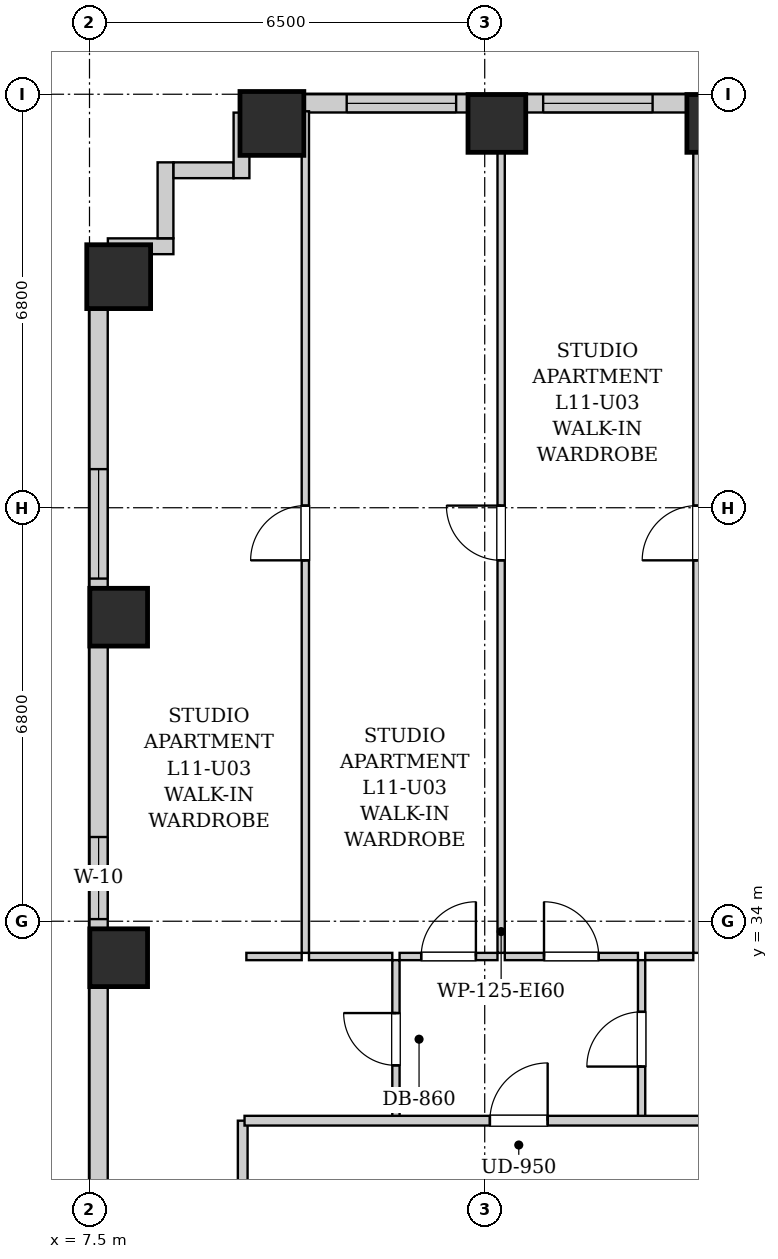
"""IFC4 building model, lengths in metres.
Left out: names, types, materials, properties, quantities, classifications, styles, units other than length and angle.
Written with IfcOpenShell. Run it as: python <this file> out.ifc"""

import sys

from ifc_helpers import new_model, si_unit, direction, frame, frame_2d, origin, origin_2d, place, context, subcontext, project, spatial, rectangle, extrude, element, fill, save


model = new_model("IFC4")
c1 = context("Model", 3, precision=1e-05, world=origin(), true_north=direction((0.0, 1.0)))
c2 = subcontext(c1, "Body", "Model", "MODEL_VIEW")
j1 = project(units=[si_unit("LENGTHUNIT", "METRE"), si_unit("PLANEANGLEUNIT", "RADIAN")], contexts=[c1])
p1 = place(None, origin())
s1 = spatial("IfcSite", under=j1, at=p1, CompositionType="ELEMENT")
p2 = place(p1, origin())
s2 = spatial("IfcBuilding", under=s1, at=p2, CompositionType="ELEMENT")
p3 = place(p2, frame((0.0, 0.0, 45.0)))
s3 = spatial("IfcBuildingStorey", under=s2, at=p3, CompositionType="ELEMENT", Elevation=45.0)
p4 = place(p3, frame((10.5, 47.12, 0.0), z_axis=(0.0, 0.0, 1.0), x_axis=(1.0, 0.0, 0.0)))
e1 = element("IfcColumn", 1, at=p4, inside=s3, PredefinedType="COLUMN", context=c2, shape_type="SweptSolid", body=[
    extrude(rectangle(XDim=1.05, YDim=1.05, at=origin_2d()), origin(), (0.0, 0.0, 1.0), 3.2),
])
for number, where, z_axis, x_axis in (
    (2, (14.2, 47.12, 0.0), (0.0, 0.0, 1.0), (1.0, 0.0, 0.0)),
    (3, (17.8, 47.12, 0.0), (0.0, 0.0, 1.0), (1.0, 0.0, 0.0)),
    (4, (7.98, 33.4, 0.0), (0.0, 0.0, 1.0), (1.0, 0.0, 0.0)),
    (5, (7.98, 39.0, 0.0), (0.0, 0.0, 1.0), (1.0, 0.0, 0.0)),
):
    element("IfcColumn", number, at=place(p3, frame(where, z_axis=z_axis, x_axis=x_axis)), inside=s3, PredefinedType="COLUMN", context=c2, shape_type="SweptSolid", body=[
        extrude(rectangle(XDim=0.95, YDim=0.95, at=origin_2d()), origin(), (0.0, 0.0, 1.0), 3.2),
    ])
p5 = place(p3, frame((7.98, 44.6, 0.0), z_axis=(0.0, 0.0, 1.0), x_axis=(1.0, 0.0, 0.0)))
e6 = element("IfcColumn", 6, at=p5, inside=s3, PredefinedType="COLUMN", context=c2, shape_type="SweptSolid", body=[
    extrude(rectangle(XDim=1.05, YDim=1.05, at=origin_2d()), origin(), (0.0, 0.0, 1.0), 3.2),
])
p6 = place(p3, frame((10.0, 47.45, 0.0), z_axis=(0.0, 0.0, 1.0), x_axis=(1.0, 0.0, 0.0)))
e7 = element("IfcWall", 7, at=p6, inside=s3, PredefinedType="SOLIDWALL", context=c2, shape_type="SweptSolid", body=[
    extrude(rectangle(XDim=25.7, YDim=0.3, at=frame_2d((12.85, 0.0))), origin(), (0.0, 0.0, 1.0), 1.975),
])
p7 = place(p6, frame((1.73, 0.0, 0.55)))
e8 = element("IfcOpeningElement", 8, at=p7, cuts=e7, PredefinedType="OPENING", context=c2, shape_type="SweptSolid", body=[
    extrude(rectangle(XDim=1.8, YDim=1.2, at=frame_2d((0.9, 0.6))), frame((0.0, 0.16, 0.0), z_axis=(0.0, -1.0, 0.0), x_axis=(1.0, 0.0, 0.0)), (0.0, 0.0, 1.0), 0.32),
])
p8 = place(p6, frame((4.961, 0.0, 0.55)))
e9 = element("IfcOpeningElement", 9, at=p8, cuts=e7, PredefinedType="OPENING", context=c2, shape_type="SweptSolid", body=[
    extrude(rectangle(XDim=1.8, YDim=1.2, at=frame_2d((0.9, 0.6))), frame((0.0, 0.16, 0.0), z_axis=(0.0, -1.0, 0.0), x_axis=(1.0, 0.0, 0.0)), (0.0, 0.0, 1.0), 0.32),
])
p9 = place(p6, frame((8.435, 0.0, 0.55)))
e10 = element("IfcOpeningElement", 10, at=p9, cuts=e7, PredefinedType="OPENING", context=c2, shape_type="SweptSolid", body=[
    extrude(rectangle(XDim=1.8, YDim=1.2, at=frame_2d((0.9, 0.6))), frame((0.0, 0.16, 0.0), z_axis=(0.0, -1.0, 0.0), x_axis=(1.0, 0.0, 0.0)), (0.0, 0.0, 1.0), 0.32),
])
p10 = place(p6, frame((11.15, 0.0, 0.55)))
e11 = element("IfcOpeningElement", 11, at=p10, cuts=e7, PredefinedType="OPENING", context=c2, shape_type="SweptSolid", body=[
    extrude(rectangle(XDim=1.35, YDim=1.2, at=frame_2d((0.675, 0.6))), frame((0.0, 0.16, 0.0), z_axis=(0.0, -1.0, 0.0), x_axis=(1.0, 0.0, 0.0)), (0.0, 0.0, 1.0), 0.32),
])
p11 = place(p6, frame((17.812, 0.0, 0.55)))
e12 = element("IfcOpeningElement", 12, at=p11, cuts=e7, PredefinedType="OPENING", context=c2, shape_type="SweptSolid", body=[
    extrude(rectangle(XDim=1.8, YDim=1.2, at=frame_2d((0.9, 0.6))), frame((0.0, 0.16, 0.0), z_axis=(0.0, -1.0, 0.0), x_axis=(1.0, 0.0, 0.0)), (0.0, 0.0, 1.0), 0.32),
])
p12 = place(p6, frame((20.765, 0.0, 0.55)))
e13 = element("IfcOpeningElement", 13, at=p12, cuts=e7, PredefinedType="OPENING", context=c2, shape_type="SweptSolid", body=[
    extrude(rectangle(XDim=1.8, YDim=1.2, at=frame_2d((0.9, 0.6))), frame((0.0, 0.16, 0.0), z_axis=(0.0, -1.0, 0.0), x_axis=(1.0, 0.0, 0.0)), (0.0, 0.0, 1.0), 0.32),
])
p13 = place(p6, frame((23.835, 0.0, 0.55)))
e14 = element("IfcOpeningElement", 14, at=p13, cuts=e7, PredefinedType="OPENING", context=c2, shape_type="SweptSolid", body=[
    extrude(rectangle(XDim=1.35, YDim=1.2, at=frame_2d((0.675, 0.6))), frame((0.0, 0.16, 0.0), z_axis=(0.0, -1.0, 0.0), x_axis=(1.0, 0.0, 0.0)), (0.0, 0.0, 1.0), 0.32),
])
p14 = place(p3, frame((7.65, 19.4, 0.0), z_axis=(0.0, 0.0, 1.0), x_axis=(0.0, 1.0, 0.0)))
e15 = element("IfcWall", 15, at=p14, inside=s3, PredefinedType="SOLIDWALL", context=c2, shape_type="SweptSolid", body=[
    extrude(rectangle(XDim=25.7, YDim=0.3, at=frame_2d((12.85, 0.0))), origin(), (0.0, 0.0, 1.0), 1.975),
])
p15 = place(p14, frame((20.235, 0.0, 0.55)))
e16 = element("IfcOpeningElement", 16, at=p15, cuts=e15, PredefinedType="OPENING", context=c2, shape_type="SweptSolid", body=[
    extrude(rectangle(XDim=1.8, YDim=1.2, at=frame_2d((0.9, 0.6))), frame((0.0, 0.16, 0.0), z_axis=(0.0, -1.0, 0.0), x_axis=(1.0, 0.0, 0.0)), (0.0, 0.0, 1.0), 0.32),
])
p16 = place(p14, frame((14.635, 0.0, 0.55)))
e17 = element("IfcOpeningElement", 17, at=p16, cuts=e15, PredefinedType="OPENING", context=c2, shape_type="SweptSolid", body=[
    extrude(rectangle(XDim=1.35, YDim=1.2, at=frame_2d((0.675, 0.6))), frame((0.0, 0.16, 0.0), z_axis=(0.0, -1.0, 0.0), x_axis=(1.0, 0.0, 0.0)), (0.0, 0.0, 1.0), 0.32),
])
p17 = place(p14, frame((5.1, 0.0, 0.55)))
e18 = element("IfcOpeningElement", 18, at=p17, cuts=e15, PredefinedType="OPENING", context=c2, shape_type="SweptSolid", body=[
    extrude(rectangle(XDim=1.8, YDim=1.2, at=frame_2d((0.9, 0.6))), frame((0.0, 0.16, 0.0), z_axis=(0.0, -1.0, 0.0), x_axis=(1.0, 0.0, 0.0)), (0.0, 0.0, 1.0), 0.32),
])
p18 = place(p14, frame((7.16, 0.0, 0.55)))
e19 = element("IfcOpeningElement", 19, at=p18, cuts=e15, PredefinedType="OPENING", context=c2, shape_type="SweptSolid", body=[
    extrude(rectangle(XDim=1.35, YDim=1.2, at=frame_2d((0.675, 0.6))), frame((0.0, 0.16, 0.0), z_axis=(0.0, -1.0, 0.0), x_axis=(1.0, 0.0, 0.0)), (0.0, 0.0, 1.0), 0.32),
])
p19 = place(p3, frame((7.802, 45.1, 0.0), z_axis=(0.0, 0.0, 1.0), x_axis=(1.0, 0.0, 0.0)))
e20 = element("IfcWall", 20, at=p19, inside=s3, PredefinedType="SOLIDWALL", context=c2, shape_type="SweptSolid", body=[
    extrude(rectangle(XDim=1.078, YDim=0.26, at=frame_2d((0.539, 0.0))), origin(), (0.0, 0.0, 1.0), 2.94),
])
p20 = place(p3, frame((8.75, 45.232, 0.0), z_axis=(0.0, 0.0, 1.0), x_axis=(0.0, 1.0, 0.0)))
e21 = element("IfcWall", 21, at=p20, inside=s3, PredefinedType="SOLIDWALL", context=c2, shape_type="SweptSolid", body=[
    extrude(rectangle(XDim=1.248, YDim=0.26, at=frame_2d((0.624, 0.0))), origin(), (0.0, 0.0, 1.0), 2.94),
])
p21 = place(p3, frame((8.882, 46.35, 0.0), z_axis=(0.0, 0.0, 1.0), x_axis=(1.0, 0.0, 0.0)))
e22 = element("IfcWall", 22, at=p21, inside=s3, PredefinedType="SOLIDWALL", context=c2, shape_type="SweptSolid", body=[
    extrude(rectangle(XDim=0.986, YDim=0.26, at=frame_2d((0.493, 0.0))), origin(), (0.0, 0.0, 1.0), 2.94),
])
p22 = place(p3, frame((10.0, 46.22, 0.0), z_axis=(0.0, 0.0, 1.0), x_axis=(0.0, 1.0, 0.0)))
e23 = element("IfcWall", 23, at=p22, inside=s3, PredefinedType="SOLIDWALL", context=c2, shape_type="SweptSolid", body=[
    extrude(rectangle(XDim=1.078, YDim=0.26, at=frame_2d((0.539, 0.0))), origin(), (0.0, 0.0, 1.0), 2.94),
])
p23 = place(p3, frame((10.02, 28.98, 0.0), z_axis=(0.0, 0.0, 1.0), x_axis=(0.0, 1.0, 0.0)))
e24 = element("IfcWall", 24, at=p23, inside=s3, PredefinedType="PARTITIONING", context=c2, shape_type="SweptSolid", body=[
    extrude(rectangle(XDim=1.74, YDim=0.16, at=frame_2d((0.87, 0.0))), origin(), (0.0, 0.0, 1.0), 2.94),
])
p24 = place(p3, frame((12.54, 30.76, 0.0), z_axis=(0.0, 0.0, 1.0), x_axis=(0.0, 1.0, 0.0)))
e25 = element("IfcWall", 25, at=p24, inside=s3, PredefinedType="PARTITIONING", context=c2, shape_type="SweptSolid", body=[
    extrude(rectangle(XDim=2.6, YDim=0.12, at=frame_2d((1.3, 0.0))), origin(), (0.0, 0.0, 1.0), 2.94),
])
p25 = place(p24, frame((0.87, 0.0, 0.0)))
e26 = element("IfcOpeningElement", 26, at=p25, cuts=e25, PredefinedType="OPENING", context=c2, shape_type="SweptSolid", body=[
    extrude(rectangle(XDim=0.86, YDim=2.05, at=frame_2d((0.43, 1.025))), frame((0.0, 0.07, 0.0), z_axis=(0.0, -1.0, 0.0), x_axis=(1.0, 0.0, 0.0)), (0.0, 0.0, 1.0), 0.14),
])
p26 = place(p3, frame((10.08, 33.42, 0.0), z_axis=(0.0, 0.0, 1.0), x_axis=(1.0, 0.0, 0.0)))
e27 = element("IfcWall", 27, at=p26, inside=s3, PredefinedType="PARTITIONING", context=c2, shape_type="SweptSolid", body=[
    extrude(rectangle(XDim=0.91, YDim=0.12, at=frame_2d((0.455, 0.0))), origin(), (0.0, 0.0, 1.0), 2.94),
])
p27 = place(p3, frame((11.11, 33.42, 0.0), z_axis=(0.0, 0.0, 1.0), x_axis=(1.0, 0.0, 0.0)))
e28 = element("IfcWall", 28, at=p27, inside=s3, PredefinedType="PARTITIONING", context=c2, shape_type="SweptSolid", body=[
    extrude(rectangle(XDim=1.37, YDim=0.12, at=frame_2d((0.685, 0.0))), origin(), (0.0, 0.0, 1.0), 2.94),
])
p28 = place(p3, frame((16.58, 30.76, 0.0), z_axis=(0.0, 0.0, 1.0), x_axis=(0.0, 1.0, 0.0)))
e29 = element("IfcWall", 29, at=p28, inside=s3, PredefinedType="PARTITIONING", context=c2, shape_type="SweptSolid", body=[
    extrude(rectangle(XDim=2.6, YDim=0.12, at=frame_2d((1.3, 0.0))), origin(), (0.0, 0.0, 1.0), 2.94),
])
p29 = place(p28, frame((0.85, 0.0, 0.0)))
e30 = element("IfcOpeningElement", 30, at=p29, cuts=e29, PredefinedType="OPENING", context=c2, shape_type="SweptSolid", body=[
    extrude(rectangle(XDim=0.9, YDim=2.05, at=frame_2d((0.45, 1.025))), frame((0.0, 0.07, 0.0), z_axis=(0.0, -1.0, 0.0), x_axis=(1.0, 0.0, 0.0)), (0.0, 0.0, 1.0), 0.14),
])
p30 = place(p3, frame((12.6, 33.42, 0.0), z_axis=(0.0, 0.0, 1.0), x_axis=(1.0, 0.0, 0.0)))
e31 = element("IfcWall", 31, at=p30, inside=s3, PredefinedType="PARTITIONING", context=c2, shape_type="SweptSolid", body=[
    extrude(rectangle(XDim=1.61, YDim=0.12, at=frame_2d((0.805, 0.0))), origin(), (0.0, 0.0, 1.0), 2.94),
])
p31 = place(p30, frame((0.355, 0.0, 0.0)))
e32 = element("IfcOpeningElement", 32, at=p31, cuts=e31, PredefinedType="OPENING", context=c2, shape_type="SweptSolid", body=[
    extrude(rectangle(XDim=0.9, YDim=2.05, at=frame_2d((0.45, 1.025))), frame((0.0, 0.07, 0.0), z_axis=(0.0, -1.0, 0.0), x_axis=(1.0, 0.0, 0.0)), (0.0, 0.0, 1.0), 0.14),
])
p32 = place(p3, frame((14.33, 33.42, 0.0), z_axis=(0.0, 0.0, 1.0), x_axis=(1.0, 0.0, 0.0)))
e33 = element("IfcWall", 33, at=p32, inside=s3, PredefinedType="PARTITIONING", context=c2, shape_type="SweptSolid", body=[
    extrude(rectangle(XDim=2.19, YDim=0.12, at=frame_2d((1.095, 0.0))), origin(), (0.0, 0.0, 1.0), 2.94),
])
p33 = place(p32, frame((0.645, 0.0, 0.0)))
e34 = element("IfcOpeningElement", 34, at=p33, cuts=e33, PredefinedType="OPENING", context=c2, shape_type="SweptSolid", body=[
    extrude(rectangle(XDim=0.9, YDim=2.05, at=frame_2d((0.45, 1.025))), frame((0.0, 0.07, 0.0), z_axis=(0.0, -1.0, 0.0), x_axis=(1.0, 0.0, 0.0)), (0.0, 0.0, 1.0), 0.14),
])
p34 = place(p3, frame((16.64, 33.42, 0.0), z_axis=(0.0, 0.0, 1.0), x_axis=(1.0, 0.0, 0.0)))
e35 = element("IfcWall", 35, at=p34, inside=s3, PredefinedType="PARTITIONING", context=c2, shape_type="SweptSolid", body=[
    extrude(rectangle(XDim=0.79, YDim=0.12, at=frame_2d((0.395, 0.0))), origin(), (0.0, 0.0, 1.0), 2.94),
])
p35 = place(p3, frame((11.05, 33.48, 0.0), z_axis=(0.0, 0.0, 1.0), x_axis=(0.0, 1.0, 0.0)))
e36 = element("IfcWall", 36, at=p35, inside=s3, PredefinedType="PARTITIONING", context=c2, shape_type="SweptSolid", body=[
    extrude(rectangle(XDim=13.84, YDim=0.12, at=frame_2d((6.92, 0.0))), origin(), (0.0, 0.0, 1.0), 2.94),
])
p36 = place(p35, frame((6.455, 0.0, 0.0)))
e37 = element("IfcOpeningElement", 37, at=p36, cuts=e36, PredefinedType="OPENING", context=c2, shape_type="SweptSolid", body=[
    extrude(rectangle(XDim=0.9, YDim=2.05, at=frame_2d((0.45, 1.025))), frame((0.0, 0.07, 0.0), z_axis=(0.0, -1.0, 0.0), x_axis=(1.0, 0.0, 0.0)), (0.0, 0.0, 1.0), 0.14),
])
p37 = place(p3, frame((14.27, 33.48, 0.0), z_axis=(0.0, 0.0, 1.0), x_axis=(0.0, 1.0, 0.0)))
e38 = element("IfcWall", 38, at=p37, inside=s3, PredefinedType="PARTITIONING", context=c2, shape_type="SweptSolid", body=[
    extrude(rectangle(XDim=13.84, YDim=0.12, at=frame_2d((6.92, 0.0))), origin(), (0.0, 0.0, 1.0), 2.94),
])
p38 = place(p37, frame((6.455, 0.0, 0.0)))
e39 = element("IfcOpeningElement", 39, at=p38, cuts=e38, PredefinedType="OPENING", context=c2, shape_type="SweptSolid", body=[
    extrude(rectangle(XDim=0.9, YDim=2.05, at=frame_2d((0.45, 1.025))), frame((0.0, 0.07, 0.0), z_axis=(0.0, -1.0, 0.0), x_axis=(1.0, 0.0, 0.0)), (0.0, 0.0, 1.0), 0.14),
])
p39 = place(p3, frame((17.49, 33.48, 0.0), z_axis=(0.0, 0.0, 1.0), x_axis=(0.0, 1.0, 0.0)))
e40 = element("IfcWall", 40, at=p39, inside=s3, PredefinedType="PARTITIONING", context=c2, shape_type="SweptSolid", body=[
    extrude(rectangle(XDim=13.84, YDim=0.12, at=frame_2d((6.92, 0.0))), origin(), (0.0, 0.0, 1.0), 2.94),
])
p40 = place(p39, frame((6.455, 0.0, 0.0)))
e41 = element("IfcOpeningElement", 41, at=p40, cuts=e40, PredefinedType="OPENING", context=c2, shape_type="SweptSolid", body=[
    extrude(rectangle(XDim=0.9, YDim=2.05, at=frame_2d((0.45, 1.025))), frame((0.0, 0.07, 0.0), z_axis=(0.0, -1.0, 0.0), x_axis=(1.0, 0.0, 0.0)), (0.0, 0.0, 1.0), 0.14),
])
p41 = place(p3, frame((10.05, 30.72, 0.0), z_axis=(0.0, 0.0, 1.0), x_axis=(1.0, 0.0, 0.0)))
e42 = element("IfcWall", 42, at=p41, inside=s3, PredefinedType="PARTITIONING", context=c2, shape_type="SweptSolid", body=[
    extrude(rectangle(XDim=33.9, YDim=0.16, at=frame_2d((16.95, 0.0))), origin(), (0.0, 0.0, 1.0), 2.94),
])
p42 = place(p41, frame((4.035, 0.0, 0.0)))
e43 = element("IfcOpeningElement", 43, at=p42, cuts=e42, PredefinedType="OPENING", context=c2, shape_type="SweptSolid", body=[
    extrude(rectangle(XDim=0.95, YDim=2.1, at=frame_2d((0.475, 1.05))), frame((0.0, 0.09, 0.0), z_axis=(0.0, -1.0, 0.0), x_axis=(1.0, 0.0, 0.0)), (0.0, 0.0, 1.0), 0.18),
])
p43 = place(p25, origin())
e44 = element("IfcDoor", 44, at=p43, inside=s3, OperationType="SINGLE_SWING_RIGHT", PredefinedType="DOOR", context=c2, shape_type="SweptSolid", body=[
    extrude(rectangle(XDim=0.86, YDim=2.05, at=frame_2d((0.43, 1.025))), frame((0.0, 0.025, 0.0), z_axis=(0.0, -1.0, 0.0), x_axis=(1.0, 0.0, 0.0)), (0.0, 0.0, 1.0), 0.05),
])
fill(e26, e44)
p44 = place(p29, origin())
e45 = element("IfcDoor", 45, at=p44, inside=s3, OperationType="SINGLE_SWING_LEFT", PredefinedType="DOOR", context=c2, shape_type="SweptSolid", body=[
    extrude(rectangle(XDim=0.9, YDim=2.05, at=frame_2d((0.45, 1.025))), frame((0.0, 0.025, 0.0), z_axis=(0.0, -1.0, 0.0), x_axis=(1.0, 0.0, 0.0)), (0.0, 0.0, 1.0), 0.05),
])
fill(e30, e45)
p45 = place(p31, origin())
e46 = element("IfcDoor", 46, at=p45, inside=s3, OperationType="SINGLE_SWING_RIGHT", PredefinedType="DOOR", context=c2, shape_type="SweptSolid", body=[
    extrude(rectangle(XDim=0.9, YDim=2.05, at=frame_2d((0.45, 1.025))), frame((0.0, 0.025, 0.0), z_axis=(0.0, -1.0, 0.0), x_axis=(1.0, 0.0, 0.0)), (0.0, 0.0, 1.0), 0.05),
])
fill(e32, e46)
p46 = place(p33, origin())
e47 = element("IfcDoor", 47, at=p46, inside=s3, OperationType="SINGLE_SWING_LEFT", PredefinedType="DOOR", context=c2, shape_type="SweptSolid", body=[
    extrude(rectangle(XDim=0.9, YDim=2.05, at=frame_2d((0.45, 1.025))), frame((0.0, 0.025, 0.0), z_axis=(0.0, -1.0, 0.0), x_axis=(1.0, 0.0, 0.0)), (0.0, 0.0, 1.0), 0.05),
])
fill(e34, e47)
p47 = place(p36, origin())
e48 = element("IfcDoor", 48, at=p47, inside=s3, OperationType="SINGLE_SWING_LEFT", PredefinedType="DOOR", context=c2, shape_type="SweptSolid", body=[
    extrude(rectangle(XDim=0.9, YDim=2.05, at=frame_2d((0.45, 1.025))), frame((0.0, 0.025, 0.0), z_axis=(0.0, -1.0, 0.0), x_axis=(1.0, 0.0, 0.0)), (0.0, 0.0, 1.0), 0.05),
])
fill(e37, e48)
p48 = place(p38, origin())
e49 = element("IfcDoor", 49, at=p48, inside=s3, OperationType="SINGLE_SWING_RIGHT", PredefinedType="DOOR", context=c2, shape_type="SweptSolid", body=[
    extrude(rectangle(XDim=0.9, YDim=2.05, at=frame_2d((0.45, 1.025))), frame((0.0, 0.025, 0.0), z_axis=(0.0, -1.0, 0.0), x_axis=(1.0, 0.0, 0.0)), (0.0, 0.0, 1.0), 0.05),
])
fill(e39, e49)
p49 = place(p40, origin())
e50 = element("IfcDoor", 50, at=p49, inside=s3, OperationType="SINGLE_SWING_LEFT", PredefinedType="DOOR", context=c2, shape_type="SweptSolid", body=[
    extrude(rectangle(XDim=0.9, YDim=2.05, at=frame_2d((0.45, 1.025))), frame((0.0, 0.025, 0.0), z_axis=(0.0, -1.0, 0.0), x_axis=(1.0, 0.0, 0.0)), (0.0, 0.0, 1.0), 0.05),
])
fill(e41, e50)
p50 = place(p42, origin())
e51 = element("IfcDoor", 51, at=p50, inside=s3, OperationType="SINGLE_SWING_RIGHT", PredefinedType="DOOR", context=c2, shape_type="SweptSolid", body=[
    extrude(rectangle(XDim=0.95, YDim=2.1, at=frame_2d((0.475, 1.05))), frame((0.0, 0.025, 0.0), z_axis=(0.0, -1.0, 0.0), x_axis=(1.0, 0.0, 0.0)), (0.0, 0.0, 1.0), 0.05),
])
fill(e43, e51)
p51 = place(p15, origin())
e52 = element("IfcWindow", 52, at=p51, inside=s3, PartitioningType="DOUBLE_PANEL_VERTICAL", PredefinedType="WINDOW", context=c2, shape_type="SweptSolid", body=[
    extrude(rectangle(XDim=1.8, YDim=1.2, at=frame_2d((0.9, 0.6))), frame((0.0, 0.03, 0.0), z_axis=(0.0, -1.0, 0.0), x_axis=(1.0, 0.0, 0.0)), (0.0, 0.0, 1.0), 0.06),
])
fill(e16, e52)
p52 = place(p16, origin())
e53 = element("IfcWindow", 53, at=p52, inside=s3, PartitioningType="SINGLE_PANEL", PredefinedType="WINDOW", context=c2, shape_type="SweptSolid", body=[
    extrude(rectangle(XDim=1.35, YDim=1.2, at=frame_2d((0.675, 0.6))), frame((0.0, 0.03, 0.0), z_axis=(0.0, -1.0, 0.0), x_axis=(1.0, 0.0, 0.0)), (0.0, 0.0, 1.0), 0.06),
])
fill(e17, e53)
p53 = place(p7, origin())
e54 = element("IfcWindow", 54, at=p53, inside=s3, PartitioningType="DOUBLE_PANEL_VERTICAL", PredefinedType="WINDOW", context=c2, shape_type="SweptSolid", body=[
    extrude(rectangle(XDim=1.8, YDim=1.2, at=frame_2d((0.9, 0.6))), frame((0.0, 0.03, 0.0), z_axis=(0.0, -1.0, 0.0), x_axis=(1.0, 0.0, 0.0)), (0.0, 0.0, 1.0), 0.06),
])
fill(e8, e54)
p54 = place(p8, origin())
e55 = element("IfcWindow", 55, at=p54, inside=s3, PartitioningType="DOUBLE_PANEL_VERTICAL", PredefinedType="WINDOW", context=c2, shape_type="SweptSolid", body=[
    extrude(rectangle(XDim=1.8, YDim=1.2, at=frame_2d((0.9, 0.6))), frame((0.0, 0.03, 0.0), z_axis=(0.0, -1.0, 0.0), x_axis=(1.0, 0.0, 0.0)), (0.0, 0.0, 1.0), 0.06),
])
fill(e9, e55)
save(model, sys.argv[1])
